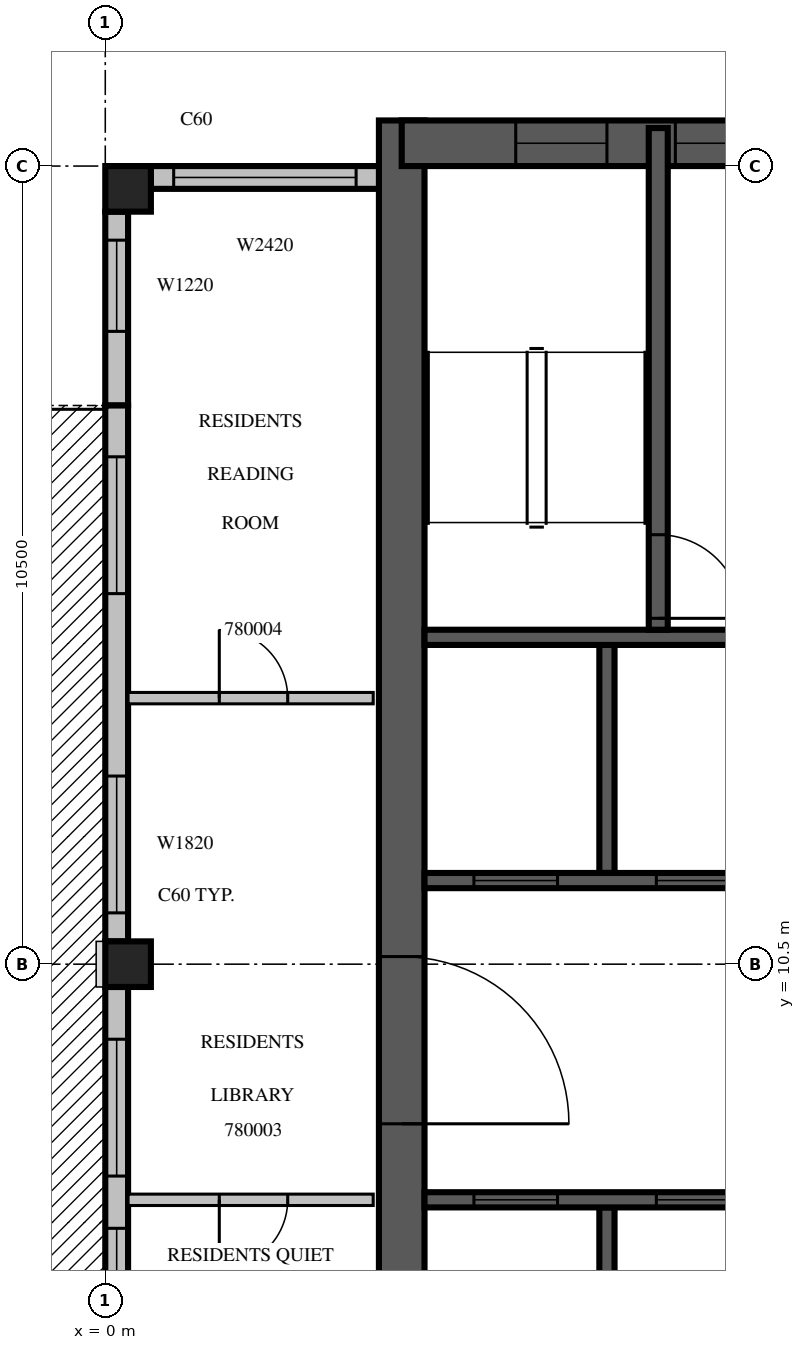
"""IFC4 building model, lengths in metres.
Left out: names, types, materials, properties, quantities, classifications, styles, units other than length and angle.
Written with IfcOpenShell. Run it as: python <this file> out.ifc"""

import sys

from ifc_helpers import new_model, si_unit, direction, frame, frame_2d, origin, origin_2d, place, context, subcontext, project, spatial, rectangle, extrude, source, transform, mapped, element, fill, save


model = new_model("IFC4")
c1 = context("Model", 3, precision=1e-05, world=origin(), true_north=direction((0.0, 1.0)))
c2 = subcontext(c1, "Body", "Model", "MODEL_VIEW")
j1 = project(units=[si_unit("LENGTHUNIT", "METRE"), si_unit("PLANEANGLEUNIT", "RADIAN")], contexts=[c1])
p1 = place(None, origin())
s1 = spatial("IfcSite", under=j1, at=p1, CompositionType="ELEMENT")
p2 = place(p1, origin())
s2 = spatial("IfcBuilding", under=s1, at=p2, CompositionType="ELEMENT")
p3 = place(p2, frame((0.0, 0.0, 340.5)))
s3 = spatial("IfcBuildingStorey", under=s2, at=p3, CompositionType="ELEMENT", Elevation=340.5)
m1 = source(origin(), c2, "Body", "SweptSolid", [
    extrude(rectangle(XDim=0.6, YDim=0.6, at=origin_2d()), origin(), (0.0, 0.0, 1.0), 3.5),
])
for number, where, z_axis, x_axis in (
    (1, (0.3, 10.5, 0.0), (0.0, 0.0, 1.0), (1.0, 0.0, 0.0)),
    (2, (0.3, 20.7, 0.0), (0.0, 0.0, 1.0), (1.0, 0.0, 0.0)),
):
    element("IfcColumn", number, at=place(p3, frame(where, z_axis=z_axis, x_axis=x_axis)), inside=s3, PredefinedType="COLUMN", context=c2, shape_type="MappedRepresentation", body=[
        mapped(m1, transform((0.0, 0.0, 0.0), scale=1.0)),
    ])
m2 = source(origin(), c2, "Body", "SweptSolid", [
    extrude(rectangle(XDim=17.4, YDim=0.6, at=frame_2d((8.7, 0.0))), origin(), (0.0, 0.0, 1.0), 3.5),
])
p4 = place(p3, frame((3.9, 4.2, 0.0), z_axis=(0.0, 0.0, 1.0), x_axis=(0.0, 1.0, 0.0)))
e3 = element("IfcWall", 3, at=p4, inside=s3, PredefinedType="SHEAR", context=c2, shape_type="MappedRepresentation", body=[
    mapped(m2, transform((0.0, 0.0, 0.0), scale=1.0)),
])
m3 = source(origin(), c2, "Body", "SweptSolid", [
    extrude(rectangle(XDim=2.2, YDim=2.1, at=frame_2d((1.1, 1.05))), frame((0.0, 0.31, 0.0), z_axis=(0.0, -1.0, 0.0), x_axis=(1.0, 0.0, 0.0)), (0.0, 0.0, 1.0), 0.62),
])
p5 = place(p4, frame((4.2, 0.0, 0.0)))
e4 = element("IfcOpeningElement", 4, at=p5, cuts=e3, PredefinedType="OPENING", context=c2, shape_type="MappedRepresentation", body=[
    mapped(m3, transform((0.0, 0.0, 0.0), scale=1.0)),
])
m4 = source(origin(), c2, "Body", "SweptSolid", [
    extrude(rectangle(XDim=6.6, YDim=0.6, at=frame_2d((3.3, 0.0))), origin(), (0.0, 0.0, 1.0), 3.5),
])
p6 = place(p3, frame((3.9, 21.3, 0.0), z_axis=(0.0, 0.0, 1.0), x_axis=(1.0, 0.0, 0.0)))
e5 = element("IfcWall", 5, at=p6, inside=s3, PredefinedType="SHEAR", context=c2, shape_type="MappedRepresentation", body=[
    mapped(m4, transform((0.0, 0.0, 0.0), scale=1.0)),
])
m5 = source(origin(), c2, "Body", "SweptSolid", [
    extrude(rectangle(XDim=1.2, YDim=2.4, at=frame_2d((0.6, 1.2))), frame((0.0, 0.31, 0.0), z_axis=(0.0, -1.0, 0.0), x_axis=(1.0, 0.0, 0.0)), (0.0, 0.0, 1.0), 0.62),
])
p7 = place(p6, frame((1.5, 0.0, 0.6)))
e6 = element("IfcOpeningElement", 6, at=p7, cuts=e5, PredefinedType="OPENING", context=c2, shape_type="MappedRepresentation", body=[
    mapped(m5, transform((0.0, 0.0, 0.0), scale=1.0)),
])
p8 = place(p6, frame((3.6, 0.0, 0.6)))
e7 = element("IfcOpeningElement", 7, at=p8, cuts=e5, PredefinedType="OPENING", context=c2, shape_type="MappedRepresentation", body=[
    mapped(m5, transform((0.0, 0.0, 0.0), scale=1.0)),
])
m6 = source(origin(), c2, "Body", "SweptSolid", [
    extrude(rectangle(XDim=3.0, YDim=0.3, at=frame_2d((1.5, 0.0))), origin(), (0.0, 0.0, 1.0), 3.1),
])
p9 = place(p3, frame((3.6, 20.85, 0.0), z_axis=(0.0, 0.0, 1.0), x_axis=(-1.0, 0.0, 0.0)))
e8 = element("IfcWall", 8, at=p9, inside=s3, PredefinedType="STANDARD", context=c2, shape_type="MappedRepresentation", body=[
    mapped(m6, transform((0.0, 0.0, 0.0), scale=1.0)),
])
m7 = source(origin(), c2, "Body", "SweptSolid", [
    extrude(rectangle(XDim=2.4, YDim=2.0, at=frame_2d((1.2, 1.0))), frame((0.0, 0.16, 0.0), z_axis=(0.0, -1.0, 0.0), x_axis=(1.0, 0.0, 0.0)), (0.0, 0.0, 1.0), 0.32),
])
p10 = place(p9, frame((0.3, 0.0, 0.6)))
e9 = element("IfcOpeningElement", 9, at=p10, cuts=e8, PredefinedType="OPENING", context=c2, shape_type="MappedRepresentation", body=[
    mapped(m7, transform((0.0, 0.0, 0.0), scale=1.0)),
])
m8 = source(origin(), c2, "Body", "SweptSolid", [
    extrude(rectangle(XDim=2.55, YDim=0.3, at=frame_2d((1.275, 0.0))), origin(), (0.0, 0.0, 1.0), 3.1),
])
p11 = place(p3, frame((0.15, 20.4, 0.0), z_axis=(0.0, 0.0, 1.0), x_axis=(0.0, -1.0, 0.0)))
e10 = element("IfcWall", 10, at=p11, inside=s3, PredefinedType="STANDARD", context=c2, shape_type="MappedRepresentation", body=[
    mapped(m8, transform((0.0, 0.0, 0.0), scale=1.0)),
])
m9 = source(origin(), c2, "Body", "SweptSolid", [
    extrude(rectangle(XDim=1.2, YDim=2.0, at=frame_2d((0.6, 1.0))), frame((0.0, 0.16, 0.0), z_axis=(0.0, -1.0, 0.0), x_axis=(1.0, 0.0, 0.0)), (0.0, 0.0, 1.0), 0.32),
])
p12 = place(p11, frame((0.375, 0.0, 0.6)))
e11 = element("IfcOpeningElement", 11, at=p12, cuts=e10, PredefinedType="OPENING", context=c2, shape_type="MappedRepresentation", body=[
    mapped(m9, transform((0.0, 0.0, 0.0), scale=1.0)),
])
m10 = source(origin(), c2, "Body", "SweptSolid", [
    extrude(rectangle(XDim=7.05, YDim=0.3, at=frame_2d((3.525, 0.0))), origin(), (0.0, 0.0, 1.0), 3.1),
])
p13 = place(p3, frame((0.15, 17.85, 0.0), z_axis=(0.0, 0.0, 1.0), x_axis=(0.0, -1.0, 0.0)))
e12 = element("IfcWall", 12, at=p13, inside=s3, PredefinedType="STANDARD", context=c2, shape_type="MappedRepresentation", body=[
    mapped(m10, transform((0.0, 0.0, 0.0), scale=1.0)),
])
m11 = source(origin(), c2, "Body", "SweptSolid", [
    extrude(rectangle(XDim=1.8, YDim=2.4, at=frame_2d((0.9, 1.2))), frame((0.0, 0.16, 0.0), z_axis=(0.0, -1.0, 0.0), x_axis=(1.0, 0.0, 0.0)), (0.0, 0.0, 1.0), 0.32),
])
p14 = place(p13, frame((0.675, 0.0, 0.0)))
e13 = element("IfcOpeningElement", 13, at=p14, cuts=e12, PredefinedType="OPENING", context=c2, shape_type="MappedRepresentation", body=[
    mapped(m11, transform((0.0, 0.0, 0.0), scale=1.0)),
])
m12 = source(origin(), c2, "Body", "SweptSolid", [
    extrude(rectangle(XDim=1.8, YDim=2.0, at=frame_2d((0.9, 1.0))), frame((0.0, 0.16, 0.0), z_axis=(0.0, -1.0, 0.0), x_axis=(1.0, 0.0, 0.0)), (0.0, 0.0, 1.0), 0.32),
])
p15 = place(p13, frame((4.875, 0.0, 0.6)))
e14 = element("IfcOpeningElement", 14, at=p15, cuts=e12, PredefinedType="OPENING", context=c2, shape_type="MappedRepresentation", body=[
    mapped(m12, transform((0.0, 0.0, 0.0), scale=1.0)),
])
m13 = source(origin(), c2, "Body", "SweptSolid", [
    extrude(rectangle(XDim=6.0, YDim=0.3, at=frame_2d((3.0, 0.0))), origin(), (0.0, 0.0, 1.0), 3.1),
])
p16 = place(p3, frame((0.15, 10.2, 0.0), z_axis=(0.0, 0.0, 1.0), x_axis=(0.0, -1.0, 0.0)))
e15 = element("IfcWall", 15, at=p16, inside=s3, PredefinedType="STANDARD", context=c2, shape_type="MappedRepresentation", body=[
    mapped(m13, transform((0.0, 0.0, 0.0), scale=1.0)),
])
p17 = place(p16, frame((3.175, 0.0, 0.6)))
e16 = element("IfcOpeningElement", 16, at=p17, cuts=e15, PredefinedType="OPENING", context=c2, shape_type="MappedRepresentation", body=[
    mapped(m12, transform((0.0, 0.0, 0.0), scale=1.0)),
])
p18 = place(p16, frame((0.688, 0.0, 0.6)))
e17 = element("IfcOpeningElement", 17, at=p18, cuts=e15, PredefinedType="OPENING", context=c2, shape_type="MappedRepresentation", body=[
    mapped(m12, transform((0.0, 0.0, 0.0), scale=1.0)),
])
m14 = source(origin(), c2, "Body", "SweptSolid", [
    extrude(rectangle(XDim=3.1, YDim=0.2, at=frame_2d((1.55, 0.0))), origin(), (0.0, 0.0, 1.0), 3.5),
])
p19 = place(p3, frame((6.6, 4.2, 0.0), z_axis=(0.0, 0.0, 1.0), x_axis=(0.0, 1.0, 0.0)))
e18 = element("IfcWall", 18, at=p19, inside=s3, PredefinedType="SOLIDWALL", context=c2, shape_type="MappedRepresentation", body=[
    mapped(m14, transform((0.0, 0.0, 0.0), scale=1.0)),
])
m15 = source(origin(), c2, "Body", "SweptSolid", [
    extrude(rectangle(XDim=3.0, YDim=0.2, at=frame_2d((1.5, 0.0))), origin(), (0.0, 0.0, 1.0), 3.5),
])
p20 = place(p3, frame((6.6, 11.7, 0.0), z_axis=(0.0, 0.0, 1.0), x_axis=(0.0, 1.0, 0.0)))
e19 = element("IfcWall", 19, at=p20, inside=s3, PredefinedType="SOLIDWALL", context=c2, shape_type="MappedRepresentation", body=[
    mapped(m15, transform((0.0, 0.0, 0.0), scale=1.0)),
])
m16 = source(origin(), c2, "Body", "SweptSolid", [
    extrude(rectangle(XDim=9.6, YDim=0.2, at=frame_2d((4.8, 0.0))), origin(), (0.0, 0.0, 1.0), 3.5),
])
p21 = place(p3, frame((4.2, 7.4, 0.0), z_axis=(0.0, 0.0, 1.0), x_axis=(1.0, 0.0, 0.0)))
e20 = element("IfcWall", 20, at=p21, inside=s3, PredefinedType="SOLIDWALL", context=c2, shape_type="MappedRepresentation", body=[
    mapped(m16, transform((0.0, 0.0, 0.0), scale=1.0)),
])
m17 = source(origin(), c2, "Body", "SweptSolid", [
    extrude(rectangle(XDim=1.1, YDim=2.1, at=frame_2d((0.55, 1.05))), frame((0.0, 0.11, 0.0), z_axis=(0.0, -1.0, 0.0), x_axis=(1.0, 0.0, 0.0)), (0.0, 0.0, 1.0), 0.22),
])
p22 = place(p21, frame((0.65, 0.0, 0.0)))
e21 = element("IfcOpeningElement", 21, at=p22, cuts=e20, PredefinedType="OPENING", context=c2, shape_type="MappedRepresentation", body=[
    mapped(m17, transform((0.0, 0.0, 0.0), scale=1.0)),
])
p23 = place(p21, frame((3.05, 0.0, 0.0)))
e22 = element("IfcOpeningElement", 22, at=p23, cuts=e20, PredefinedType="OPENING", context=c2, shape_type="MappedRepresentation", body=[
    mapped(m17, transform((0.0, 0.0, 0.0), scale=1.0)),
])
p24 = place(p21, frame((5.45, 0.0, 0.0)))
e23 = element("IfcOpeningElement", 23, at=p24, cuts=e20, PredefinedType="OPENING", context=c2, shape_type="MappedRepresentation", body=[
    mapped(m17, transform((0.0, 0.0, 0.0), scale=1.0)),
])
p25 = place(p21, frame((7.85, 0.0, 0.0)))
e24 = element("IfcOpeningElement", 24, at=p25, cuts=e20, PredefinedType="OPENING", context=c2, shape_type="MappedRepresentation", body=[
    mapped(m17, transform((0.0, 0.0, 0.0), scale=1.0)),
])
m18 = source(origin(), c2, "Body", "SweptSolid", [
    extrude(rectangle(XDim=4.8, YDim=0.2, at=frame_2d((2.4, 0.0))), origin(), (0.0, 0.0, 1.0), 3.5),
])
p26 = place(p3, frame((4.2, 11.6, 0.0), z_axis=(0.0, 0.0, 1.0), x_axis=(1.0, 0.0, 0.0)))
e25 = element("IfcWall", 25, at=p26, inside=s3, PredefinedType="SOLIDWALL", context=c2, shape_type="MappedRepresentation", body=[
    mapped(m18, transform((0.0, 0.0, 0.0), scale=1.0)),
])
p27 = place(p26, frame((0.65, 0.0, 0.0)))
e26 = element("IfcOpeningElement", 26, at=p27, cuts=e25, PredefinedType="OPENING", context=c2, shape_type="MappedRepresentation", body=[
    mapped(m17, transform((0.0, 0.0, 0.0), scale=1.0)),
])
p28 = place(p26, frame((3.05, 0.0, 0.0)))
e27 = element("IfcOpeningElement", 27, at=p28, cuts=e25, PredefinedType="OPENING", context=c2, shape_type="MappedRepresentation", body=[
    mapped(m17, transform((0.0, 0.0, 0.0), scale=1.0)),
])
p29 = place(p3, frame((4.2, 14.8, 0.0), z_axis=(0.0, 0.0, 1.0), x_axis=(1.0, 0.0, 0.0)))
e28 = element("IfcWall", 28, at=p29, inside=s3, PredefinedType="SOLIDWALL", context=c2, shape_type="MappedRepresentation", body=[
    mapped(m18, transform((0.0, 0.0, 0.0), scale=1.0)),
])
m19 = source(origin(), c2, "Body", "SweptSolid", [
    extrude(rectangle(XDim=6.6, YDim=0.25, at=frame_2d((3.3, 0.0))), origin(), (0.0, 0.0, 1.0), 3.1),
])
p30 = place(p3, frame((7.275, 14.9, 0.0), z_axis=(0.0, 0.0, 1.0), x_axis=(0.0, 1.0, 0.0)))
e29 = element("IfcWall", 29, at=p30, inside=s3, PredefinedType="SOLIDWALL", context=c2, shape_type="MappedRepresentation", body=[
    mapped(m19, transform((0.0, 0.0, 0.0), scale=1.0)),
])
m20 = source(origin(), c2, "Body", "SweptSolid", [
    extrude(rectangle(XDim=1.1, YDim=2.1, at=frame_2d((0.55, 1.05))), frame((0.0, 0.135, 0.0), z_axis=(0.0, -1.0, 0.0), x_axis=(1.0, 0.0, 0.0)), (0.0, 0.0, 1.0), 0.27),
])
p31 = place(p30, frame((0.15, 0.0, 0.0)))
e30 = element("IfcOpeningElement", 30, at=p31, cuts=e29, PredefinedType="OPENING", context=c2, shape_type="MappedRepresentation", body=[
    mapped(m20, transform((0.0, 0.0, 0.0), scale=1.0)),
])
m21 = source(origin(), c2, "Body", "SweptSolid", [
    extrude(rectangle(XDim=3.225, YDim=0.15, at=frame_2d((1.613, 0.0))), origin(), (0.0, 0.0, 1.0), 3.1),
])
p32 = place(p3, frame((0.3, 7.4, 0.0), z_axis=(0.0, 0.0, 1.0), x_axis=(1.0, 0.0, 0.0)))
e31 = element("IfcWall", 31, at=p32, inside=s3, PredefinedType="PARTITIONING", context=c2, shape_type="MappedRepresentation", body=[
    mapped(m21, transform((0.0, 0.0, 0.0), scale=1.0)),
])
m22 = source(origin(), c2, "Body", "SweptSolid", [
    extrude(rectangle(XDim=0.9, YDim=2.1, at=frame_2d((0.45, 1.05))), frame((0.0, 0.085, 0.0), z_axis=(0.0, -1.0, 0.0), x_axis=(1.0, 0.0, 0.0)), (0.0, 0.0, 1.0), 0.17),
])
p33 = place(p32, frame((1.2, 0.0, 0.0)))
e32 = element("IfcOpeningElement", 32, at=p33, cuts=e31, PredefinedType="OPENING", context=c2, shape_type="MappedRepresentation", body=[
    mapped(m22, transform((0.0, 0.0, 0.0), scale=1.0)),
])
p34 = place(p3, frame((0.3, 14.0, 0.0), z_axis=(0.0, 0.0, 1.0), x_axis=(1.0, 0.0, 0.0)))
e33 = element("IfcWall", 33, at=p34, inside=s3, PredefinedType="PARTITIONING", context=c2, shape_type="MappedRepresentation", body=[
    mapped(m21, transform((0.0, 0.0, 0.0), scale=1.0)),
])
p35 = place(p34, frame((1.2, 0.0, 0.0)))
e34 = element("IfcOpeningElement", 34, at=p35, cuts=e33, PredefinedType="OPENING", context=c2, shape_type="MappedRepresentation", body=[
    mapped(m22, transform((0.0, 0.0, 0.0), scale=1.0)),
])
m23 = source(origin(), c2, "Body", "SweptSolid", [
    extrude(rectangle(XDim=2.4, YDim=2.0, at=frame_2d((1.2, 1.0))), frame((0.0, 0.03, 0.0), z_axis=(0.0, -1.0, 0.0), x_axis=(1.0, 0.0, 0.0)), (0.0, 0.0, 1.0), 0.06),
])
p36 = place(p10, origin())
e35 = element("IfcWindow", 35, at=p36, inside=s3, PartitioningType="SINGLE_PANEL", PredefinedType="WINDOW", context=c2, shape_type="MappedRepresentation", body=[
    mapped(m23, transform((0.0, 0.0, 0.0), scale=1.0)),
])
fill(e9, e35)
m24 = source(origin(), c2, "Body", "SweptSolid", [
    extrude(rectangle(XDim=1.2, YDim=2.0, at=frame_2d((0.6, 1.0))), frame((0.0, 0.03, 0.0), z_axis=(0.0, -1.0, 0.0), x_axis=(1.0, 0.0, 0.0)), (0.0, 0.0, 1.0), 0.06),
])
p37 = place(p12, origin())
e36 = element("IfcWindow", 36, at=p37, inside=s3, PartitioningType="SINGLE_PANEL", PredefinedType="WINDOW", context=c2, shape_type="MappedRepresentation", body=[
    mapped(m24, transform((0.0, 0.0, 0.0), scale=1.0)),
])
fill(e11, e36)
m25 = source(origin(), c2, "Body", "SweptSolid", [
    extrude(rectangle(XDim=1.8, YDim=2.4, at=frame_2d((0.9, 1.2))), frame((0.0, 0.025, 0.0), z_axis=(0.0, -1.0, 0.0), x_axis=(1.0, 0.0, 0.0)), (0.0, 0.0, 1.0), 0.05),
])
p38 = place(p14, origin())
e37 = element("IfcDoor", 37, at=p38, inside=s3, OperationType="SLIDING_TO_LEFT", PredefinedType="DOOR", context=c2, shape_type="MappedRepresentation", body=[
    mapped(m25, transform((0.0, 0.0, 0.0), scale=1.0)),
])
fill(e13, e37)
m26 = source(origin(), c2, "Body", "SweptSolid", [
    extrude(rectangle(XDim=1.8, YDim=2.0, at=frame_2d((0.9, 1.0))), frame((0.0, 0.03, 0.0), z_axis=(0.0, -1.0, 0.0), x_axis=(1.0, 0.0, 0.0)), (0.0, 0.0, 1.0), 0.06),
])
p39 = place(p15, origin())
e38 = element("IfcWindow", 38, at=p39, inside=s3, PartitioningType="SINGLE_PANEL", PredefinedType="WINDOW", context=c2, shape_type="MappedRepresentation", body=[
    mapped(m26, transform((0.0, 0.0, 0.0), scale=1.0)),
])
fill(e14, e38)
p40 = place(p17, origin())
e39 = element("IfcWindow", 39, at=p40, inside=s3, PartitioningType="SINGLE_PANEL", PredefinedType="WINDOW", context=c2, shape_type="MappedRepresentation", body=[
    mapped(m26, transform((0.0, 0.0, 0.0), scale=1.0)),
])
fill(e16, e39)
p41 = place(p18, origin())
e40 = element("IfcWindow", 40, at=p41, inside=s3, PartitioningType="SINGLE_PANEL", PredefinedType="WINDOW", context=c2, shape_type="MappedRepresentation", body=[
    mapped(m26, transform((0.0, 0.0, 0.0), scale=1.0)),
])
fill(e17, e40)
m27 = source(origin(), c2, "Body", "SweptSolid", [
    extrude(rectangle(XDim=1.1, YDim=2.1, at=frame_2d((0.55, 1.05))), frame((0.0, 0.025, 0.0), z_axis=(0.0, -1.0, 0.0), x_axis=(1.0, 0.0, 0.0)), (0.0, 0.0, 1.0), 0.05),
])
p42 = place(p22, origin())
e41 = element("IfcDoor", 41, at=p42, inside=s3, OperationType="SLIDING_TO_LEFT", PredefinedType="DOOR", context=c2, shape_type="MappedRepresentation", body=[
    mapped(m27, transform((0.0, 0.0, 0.0), scale=1.0)),
])
fill(e21, e41)
p43 = place(p23, origin())
e42 = element("IfcDoor", 42, at=p43, inside=s3, OperationType="SLIDING_TO_LEFT", PredefinedType="DOOR", context=c2, shape_type="MappedRepresentation", body=[
    mapped(m27, transform((0.0, 0.0, 0.0), scale=1.0)),
])
fill(e22, e42)
p44 = place(p27, origin())
e43 = element("IfcDoor", 43, at=p44, inside=s3, OperationType="SLIDING_TO_LEFT", PredefinedType="DOOR", context=c2, shape_type="MappedRepresentation", body=[
    mapped(m27, transform((0.0, 0.0, 0.0), scale=1.0)),
])
fill(e26, e43)
p45 = place(p28, origin())
e44 = element("IfcDoor", 44, at=p45, inside=s3, OperationType="SLIDING_TO_LEFT", PredefinedType="DOOR", context=c2, shape_type="MappedRepresentation", body=[
    mapped(m27, transform((0.0, 0.0, 0.0), scale=1.0)),
])
fill(e27, e44)
p46 = place(p31, origin())
e45 = element("IfcDoor", 45, at=p46, inside=s3, OperationType="SINGLE_SWING_RIGHT", PredefinedType="DOOR", context=c2, shape_type="MappedRepresentation", body=[
    mapped(m27, transform((0.0, 0.0, 0.0), scale=1.0)),
])
fill(e30, e45)
m28 = source(origin(), c2, "Body", "SweptSolid", [
    extrude(rectangle(XDim=2.2, YDim=2.1, at=frame_2d((1.1, 1.05))), frame((0.0, 0.025, 0.0), z_axis=(0.0, -1.0, 0.0), x_axis=(1.0, 0.0, 0.0)), (0.0, 0.0, 1.0), 0.05),
])
p47 = place(p5, origin())
e46 = element("IfcDoor", 46, at=p47, inside=s3, OperationType="DOUBLE_DOOR_SINGLE_SWING", PredefinedType="DOOR", context=c2, shape_type="MappedRepresentation", body=[
    mapped(m28, transform((0.0, 0.0, 0.0), scale=1.0)),
])
fill(e4, e46)
m29 = source(origin(), c2, "Body", "SweptSolid", [
    extrude(rectangle(XDim=1.2, YDim=2.4, at=frame_2d((0.6, 1.2))), frame((0.0, 0.03, 0.0), z_axis=(0.0, -1.0, 0.0), x_axis=(1.0, 0.0, 0.0)), (0.0, 0.0, 1.0), 0.06),
])
p48 = place(p7, origin())
e47 = element("IfcWindow", 47, at=p48, inside=s3, PartitioningType="SINGLE_PANEL", PredefinedType="WINDOW", context=c2, shape_type="MappedRepresentation", body=[
    mapped(m29, transform((0.0, 0.0, 0.0), scale=1.0)),
])
fill(e6, e47)
p49 = place(p8, origin())
e48 = element("IfcWindow", 48, at=p49, inside=s3, PartitioningType="SINGLE_PANEL", PredefinedType="WINDOW", context=c2, shape_type="MappedRepresentation", body=[
    mapped(m29, transform((0.0, 0.0, 0.0), scale=1.0)),
])
fill(e7, e48)
m30 = source(origin(), c2, "Body", "SweptSolid", [
    extrude(rectangle(XDim=0.9, YDim=2.1, at=frame_2d((0.45, 1.05))), frame((0.0, 0.025, 0.0), z_axis=(0.0, -1.0, 0.0), x_axis=(1.0, 0.0, 0.0)), (0.0, 0.0, 1.0), 0.05),
])
p50 = place(p33, origin())
e49 = element("IfcDoor", 49, at=p50, inside=s3, OperationType="SINGLE_SWING_RIGHT", PredefinedType="DOOR", context=c2, shape_type="MappedRepresentation", body=[
    mapped(m30, transform((0.0, 0.0, 0.0), scale=1.0)),
])
fill(e32, e49)
p51 = place(p35, origin())
e50 = element("IfcDoor", 50, at=p51, inside=s3, OperationType="SINGLE_SWING_LEFT", PredefinedType="DOOR", context=c2, shape_type="MappedRepresentation", body=[
    mapped(m30, transform((0.0, 0.0, 0.0), scale=1.0)),
])
fill(e34, e50)
save(model, sys.argv[1])
